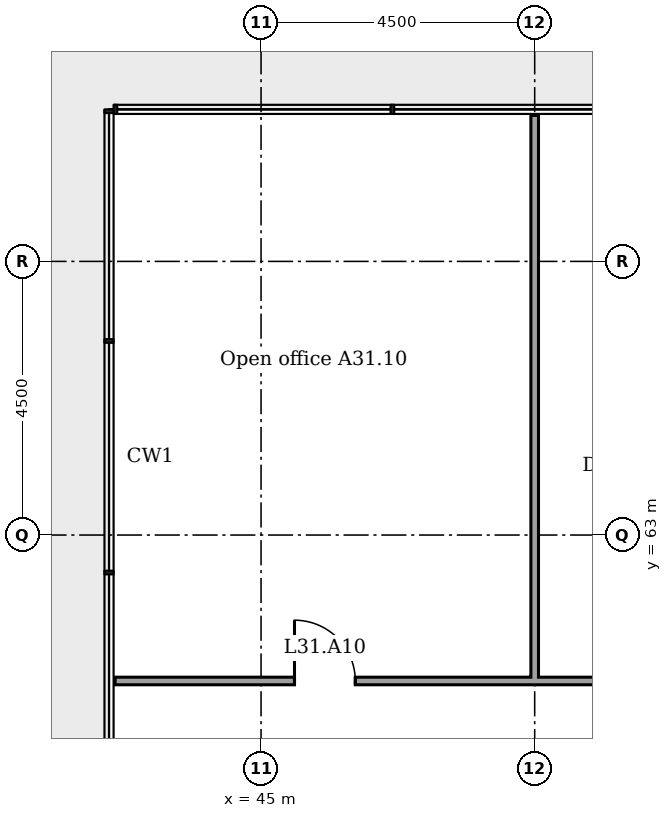
"""IFC4 building model, lengths in metres.
Left out: names, types, materials, properties, quantities, classifications, styles, units other than length and angle.
Written with IfcOpenShell. Run it as: python <this file> out.ifc"""

import sys

from ifc_helpers import new_model, si_unit, direction, frame, frame_2d, origin, place, context, subcontext, project, spatial, rectangle, extrude, element, fill, save


model = new_model("IFC4")
c1 = context("Model", 3, precision=1e-05, world=origin(), true_north=direction((0.0, 1.0)))
c2 = subcontext(c1, "Body", "Model", "MODEL_VIEW")
j1 = project(units=[si_unit("LENGTHUNIT", "METRE"), si_unit("PLANEANGLEUNIT", "RADIAN")], contexts=[c1])
p1 = place(None, origin())
s1 = spatial("IfcSite", under=j1, at=p1, CompositionType="ELEMENT")
p2 = place(p1, origin())
s2 = spatial("IfcBuilding", under=s1, at=p2, CompositionType="ELEMENT")
p3 = place(p2, frame((0.0, 0.0, 128.0)))
s3 = spatial("IfcBuildingStorey", under=s2, at=p3, CompositionType="ELEMENT", Elevation=128.0)
p4 = place(p3, frame((42.6, 60.6, 0.0)))
e1 = element("IfcWall", 1, at=p4, inside=s3, PredefinedType="PARTITIONING", context=c2, shape_type="SweptSolid", body=[
    extrude(rectangle(XDim=18.962, YDim=0.125, at=frame_2d((9.481, 0.0))), origin(), (0.0, 0.0, 1.0), 3.45),
])
p5 = place(p4, frame((16.9, 0.0, 0.0)))
e2 = element("IfcOpeningElement", 2, at=p5, cuts=e1, PredefinedType="OPENING", context=c2, shape_type="SweptSolid", body=[
    extrude(rectangle(XDim=1.0, YDim=2.1, at=frame_2d((0.5, 1.05))), frame((0.0, 0.073, 0.0), z_axis=(0.0, -1.0, 0.0), x_axis=(1.0, 0.0, 0.0)), (0.0, 0.0, 1.0), 0.145),
])
p6 = place(p4, frame((12.695, 0.0, 0.0)))
e3 = element("IfcOpeningElement", 3, at=p6, cuts=e1, PredefinedType="OPENING", context=c2, shape_type="SweptSolid", body=[
    extrude(rectangle(XDim=1.0, YDim=2.1, at=frame_2d((0.5, 1.05))), frame((0.0, 0.073, 0.0), z_axis=(0.0, -1.0, 0.0), x_axis=(1.0, 0.0, 0.0)), (0.0, 0.0, 1.0), 0.145),
])
p7 = place(p4, frame((9.105, 0.0, 0.0)))
e4 = element("IfcOpeningElement", 4, at=p7, cuts=e1, PredefinedType="OPENING", context=c2, shape_type="SweptSolid", body=[
    extrude(rectangle(XDim=1.0, YDim=2.1, at=frame_2d((0.5, 1.05))), frame((0.0, 0.073, 0.0), z_axis=(0.0, -1.0, 0.0), x_axis=(1.0, 0.0, 0.0)), (0.0, 0.0, 1.0), 0.145),
])
p8 = place(p4, frame((2.95, 0.0, 0.0)))
e5 = element("IfcOpeningElement", 5, at=p8, cuts=e1, PredefinedType="OPENING", context=c2, shape_type="SweptSolid", body=[
    extrude(rectangle(XDim=1.0, YDim=2.1, at=frame_2d((0.5, 1.05))), frame((0.0, 0.073, 0.0), z_axis=(0.0, -1.0, 0.0), x_axis=(1.0, 0.0, 0.0)), (0.0, 0.0, 1.0), 0.145),
])
p9 = place(p3, frame((49.5, 60.6, 0.0), z_axis=(0.0, 0.0, 1.0), x_axis=(0.0, 1.0, 0.0)))
e6 = element("IfcWall", 6, at=p9, inside=s3, PredefinedType="PARTITIONING", context=c2, shape_type="SweptSolid", body=[
    extrude(rectangle(XDim=9.3, YDim=0.125, at=frame_2d((4.65, 0.0))), origin(), (0.0, 0.0, 1.0), 2.766),
])
p10 = place(p8, origin())
e7 = element("IfcDoor", 7, at=p10, inside=s3, OperationType="SINGLE_SWING_RIGHT", PredefinedType="DOOR", context=c2, shape_type="SweptSolid", body=[
    extrude(rectangle(XDim=1.0, YDim=2.1, at=frame_2d((0.5, 1.05))), frame((0.0, 0.025, 0.0), z_axis=(0.0, -1.0, 0.0), x_axis=(1.0, 0.0, 0.0)), (0.0, 0.0, 1.0), 0.05),
])
fill(e5, e7)
save(model, sys.argv[1])
